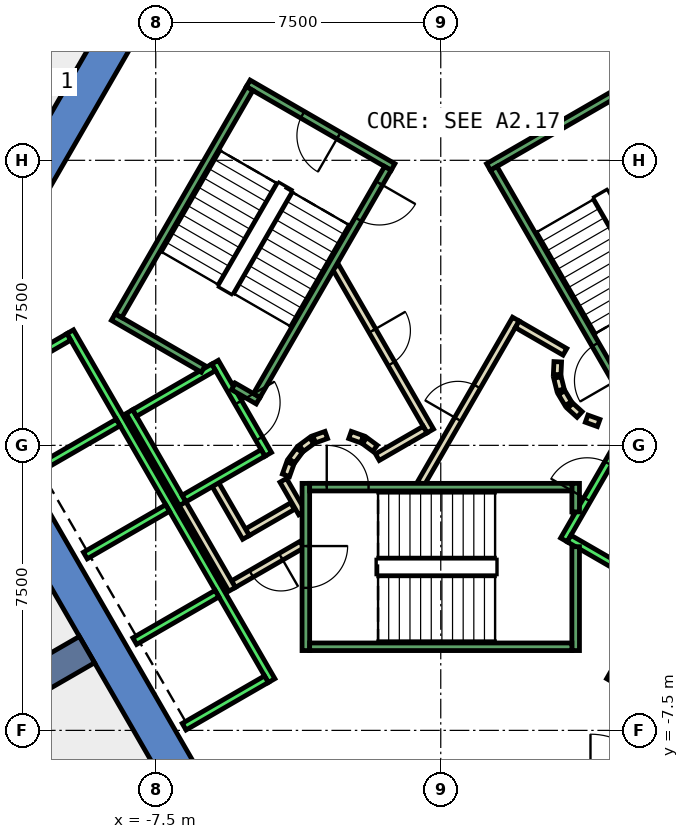
"""IFC4 building model, lengths in metres.
Left out: names, types, materials, properties, quantities, classifications, styles, units other than length and angle.
Written with IfcOpenShell. Run it as: python <this file> out.ifc"""

import sys

from ifc_helpers import new_model, si_unit, direction, frame, frame_2d, origin, place, context, subcontext, project, spatial, polyline, rectangle, outline, extrude, element, fill, save


model = new_model("IFC4")
c1 = context("Model", 3, precision=1e-05, world=origin(), true_north=direction((0.0, 1.0)))
c2 = subcontext(c1, "Body", "Model", "MODEL_VIEW")
j1 = project(units=[si_unit("LENGTHUNIT", "METRE"), si_unit("PLANEANGLEUNIT", "RADIAN")], contexts=[c1])
p1 = place(None, origin())
s1 = spatial("IfcSite", under=j1, at=p1, CompositionType="ELEMENT")
p2 = place(p1, origin())
s2 = spatial("IfcBuilding", under=s1, at=p2, CompositionType="ELEMENT")
p3 = place(p2, frame((0.0, 0.0, 77.0)))
s3 = spatial("IfcBuildingStorey", under=s2, at=p3, CompositionType="ELEMENT", Elevation=77.0)
p4 = place(p3, frame((0.0, 0.0, -0.4)))
e1 = element("IfcWall", 1, at=p4, inside=s3, PredefinedType="SHEAR", context=c2, shape_type="SweptSolid", body=[
    extrude(outline(polyline([(-12.267, 5.252), (-11.444, 4.777), (-6.38, 13.55), (-6.928, 14.5), (-12.267, 5.252)])), origin(), (0.0, 0.0, 1.0), 4.0),
])
p5 = place(p3, frame((0.0, 0.0, -0.4)))
e2 = element("IfcWall", 2, at=p5, inside=s3, PredefinedType="SHEAR", context=c2, shape_type="SweptSolid", body=[
    extrude(outline(polyline([(-13.856, 2.5), (-6.928, -9.5), (-6.38, -8.55), (-12.759, 2.5), (-13.856, 2.5)])), origin(), (0.0, 0.0, 1.0), 4.0),
])
p6 = place(p3, frame((-9.31, -5.375, -0.4), z_axis=(0.0, 0.0, 1.0), x_axis=(-0.866017533419, -0.500013631625, 0.0)))
e3 = element("IfcWall", 3, at=p6, inside=s3, PredefinedType="SHEAR", context=c2, shape_type="SweptSolid", body=[
    extrude(rectangle(XDim=9.0, YDim=0.8, at=frame_2d((4.5, 0.0))), origin(), (0.0, 0.0, 1.0), 4.0),
])
p7 = place(p3, frame((-3.9, -1.599, 0.0), z_axis=(0.0, 0.0, 1.0), x_axis=(-0.865969445389, -0.500096910261, 0.0)))
e4 = element("IfcWall", 4, at=p7, inside=s3, PredefinedType="PARTITIONING", context=c2, shape_type="SweptSolid", body=[
    extrude(rectangle(XDim=1.373, YDim=0.2, at=frame_2d((0.687, 0.0))), origin(), (0.0, 0.0, 1.0), 3.6),
])
p8 = place(p3, frame((-5.126, -2.422, 0.0), z_axis=(0.0, 0.0, 1.0), x_axis=(-0.500062241894, 0.865989465428, 0.0)))
e5 = element("IfcWall", 5, at=p8, inside=s3, PredefinedType="PARTITIONING", context=c2, shape_type="SweptSolid", body=[
    extrude(rectangle(XDim=1.7, YDim=0.2, at=frame_2d((0.85, 0.0))), origin(), (0.0, 0.0, 1.0), 3.6),
])
p9 = place(p3, frame((-3.65, -2.61, 0.0), z_axis=(0.0, 0.0, 1.0), x_axis=(-0.866072462134, -0.499918483688, 0.0)))
e6 = element("IfcWall", 6, at=p9, inside=s3, PredefinedType="PARTITIONING", context=c2, shape_type="SweptSolid", body=[
    extrude(rectangle(XDim=2.084, YDim=0.2, at=frame_2d((1.042, 0.0))), origin(), (0.0, 0.0, 1.0), 3.6),
])
p10 = place(p9, frame((0.642, 0.0, 0.0)))
e7 = element("IfcOpeningElement", 7, at=p10, cuts=e6, PredefinedType="OPENING", context=c2, shape_type="SweptSolid", body=[
    extrude(rectangle(XDim=0.9, YDim=2.1, at=frame_2d((0.45, 1.05))), frame((0.0, 0.11, 0.0), z_axis=(0.0, -1.0, 0.0), x_axis=(1.0, 0.0, 0.0)), (0.0, 0.0, 1.0), 0.22),
])
p11 = place(p3, frame((-5.492, -3.788, 0.0), z_axis=(0.0, 0.0, 1.0), x_axis=(-0.500008949224, 0.866020236886, 0.0)))
e8 = element("IfcWall", 8, at=p11, inside=s3, PredefinedType="PARTITIONING", context=c2, shape_type="SweptSolid", body=[
    extrude(rectangle(XDim=2.68, YDim=0.2, at=frame_2d((1.34, 0.0))), origin(), (0.0, 0.0, 1.0), 3.6),
])
p12 = place(p3, frame((-4.145, -0.92, 0.0), z_axis=(0.0, 0.0, 1.0), x_axis=(0.499743786207, -0.866173278362, 0.0)))
e9 = element("IfcWall", 9, at=p12, inside=s3, PredefinedType="PARTITIONING", context=c2, shape_type="SweptSolid", body=[
    extrude(rectangle(XDim=0.991, YDim=0.2, at=frame_2d((0.495, 0.0))), origin(), (0.0, 0.0, 1.0), 3.6),
])
p13 = place(p3, frame((-0.52, -1.0, 0.0), z_axis=(0.0, 0.0, 1.0), x_axis=(0.50011622646, 0.865958290007, 0.0)))
e10 = element("IfcWall", 10, at=p13, inside=s3, PredefinedType="PARTITIONING", context=c2, shape_type="SweptSolid", body=[
    extrude(rectangle(XDim=4.991, YDim=0.2, at=frame_2d((2.496, 0.0))), origin(), (0.0, 0.0, 1.0), 3.6),
])
p14 = place(p13, frame((1.945, 0.0, 0.0)))
e11 = element("IfcOpeningElement", 11, at=p14, cuts=e10, PredefinedType="OPENING", context=c2, shape_type="SweptSolid", body=[
    extrude(rectangle(XDim=1.0, YDim=2.1, at=frame_2d((0.5, 1.05))), frame((0.0, 0.11, 0.0), z_axis=(0.0, -1.0, 0.0), x_axis=(1.0, 0.0, 0.0)), (0.0, 0.0, 1.0), 0.22),
])
p15 = place(p3, frame((2.012, 3.186, 0.0), z_axis=(0.0, 0.0, 1.0), x_axis=(0.865891012941, -0.500232699559, 0.0)))
e12 = element("IfcWall", 12, at=p15, inside=s3, PredefinedType="PARTITIONING", context=c2, shape_type="SweptSolid", body=[
    extrude(rectangle(XDim=1.449, YDim=0.2, at=frame_2d((0.725, 0.0))), origin(), (0.0, 0.0, 1.0), 3.6),
])
p16 = place(p3, frame((3.079, 2.199, 0.0), z_axis=(0.0, 0.0, 1.0), x_axis=(-0.047771483479, -0.998858290933, 0.0)))
e13 = element("IfcWall", 13, at=p16, inside=s3, PredefinedType="PARTITIONING", context=c2, shape_type="SweptSolid", body=[
    extrude(rectangle(XDim=0.337, YDim=0.2, at=frame_2d((0.169, 0.0))), origin(), (0.0, 0.0, 1.0), 3.6),
])
p17 = place(p3, frame((3.07, 1.786, 0.0), z_axis=(0.0, 0.0, 1.0), x_axis=(0.242705583207, -0.970099994784, 0.0)))
e14 = element("IfcWall", 14, at=p17, inside=s3, PredefinedType="PARTITIONING", context=c2, shape_type="SweptSolid", body=[
    extrude(rectangle(XDim=0.338, YDim=0.2, at=frame_2d((0.169, 0.0))), origin(), (0.0, 0.0, 1.0), 3.6),
])
for number, where, z_axis, x_axis in (
    (15, (3.182, 1.388, 0.0), (0.0, 0.0, 1.0), (0.512, -0.859, 0.0)),
    (16, (3.404, 1.039, 0.0), (0.0, 0.0, 1.0), (0.74, -0.672, 0.0)),
):
    element("IfcWall", number, at=place(p3, frame(where, z_axis=z_axis, x_axis=x_axis)), inside=s3, PredefinedType="PARTITIONING", context=c2, shape_type="SweptSolid", body=[
        extrude(rectangle(XDim=0.338, YDim=0.2, at=frame_2d((0.169, 0.0))), origin(), (0.0, 0.0, 1.0), 3.6),
    ])
p18 = place(p3, frame((3.838, 0.702, 0.0), z_axis=(0.0, 0.0, 1.0), x_axis=(0.941035081519, -0.338308993895, 0.0)))
e17 = element("IfcWall", 17, at=p18, inside=s3, PredefinedType="PARTITIONING", context=c2, shape_type="SweptSolid", body=[
    extrude(rectangle(XDim=0.337, YDim=0.2, at=frame_2d((0.168, 0.0))), origin(), (0.0, 0.0, 1.0), 3.6),
])
p19 = place(p3, frame((-2.771, 4.7, 0.0), z_axis=(0.0, 0.0, 1.0), x_axis=(0.499969479948, -0.866043023828, 0.0)))
e18 = element("IfcWall", 18, at=p19, inside=s3, PredefinedType="PARTITIONING", context=c2, shape_type="SweptSolid", body=[
    extrude(rectangle(XDim=4.99, YDim=0.2, at=frame_2d((2.495, 0.0))), origin(), (0.0, 0.0, 1.0), 3.6),
])
p20 = place(p19, frame((1.945, 0.0, 0.0)))
e19 = element("IfcOpeningElement", 19, at=p20, cuts=e18, PredefinedType="OPENING", context=c2, shape_type="SweptSolid", body=[
    extrude(rectangle(XDim=1.0, YDim=2.1, at=frame_2d((0.5, 1.05))), frame((0.0, 0.11, 0.0), z_axis=(0.0, -1.0, 0.0), x_axis=(1.0, 0.0, 0.0)), (0.0, 0.0, 1.0), 0.22),
])
p21 = place(p3, frame((-0.412, 0.414, 0.0), z_axis=(0.0, 0.0, 1.0), x_axis=(-0.866017369001, -0.500013916395, 0.0)))
e20 = element("IfcWall", 20, at=p21, inside=s3, PredefinedType="PARTITIONING", context=c2, shape_type="SweptSolid", body=[
    extrude(rectangle(XDim=1.45, YDim=0.2, at=frame_2d((0.725, 0.0))), origin(), (0.0, 0.0, 1.0), 3.6),
])
p22 = place(p3, frame((-1.731, -0.077, 0.0), z_axis=(0.0, 0.0, 1.0), x_axis=(-0.804311165252, 0.594208338422, 0.0)))
e21 = element("IfcWall", 21, at=p22, inside=s3, PredefinedType="PARTITIONING", context=c2, shape_type="SweptSolid", body=[
    extrude(rectangle(XDim=0.338, YDim=0.2, at=frame_2d((0.169, 0.0))), origin(), (0.0, 0.0, 1.0), 3.6),
])
p23 = place(p3, frame((-2.07, 0.16, 0.0), z_axis=(0.0, 0.0, 1.0), x_axis=(-0.942199461132, 0.335052496547, 0.0)))
e22 = element("IfcWall", 22, at=p23, inside=s3, PredefinedType="PARTITIONING", context=c2, shape_type="SweptSolid", body=[
    extrude(rectangle(XDim=0.337, YDim=0.2, at=frame_2d((0.169, 0.0))), origin(), (0.0, 0.0, 1.0), 3.6),
])
p24 = place(p3, frame((-3.012, 0.273, 0.0), z_axis=(0.0, 0.0, 1.0), x_axis=(-0.942280615813, -0.334824194261, 0.0)))
e23 = element("IfcWall", 23, at=p24, inside=s3, PredefinedType="PARTITIONING", context=c2, shape_type="SweptSolid", body=[
    extrude(rectangle(XDim=0.338, YDim=0.2, at=frame_2d((0.169, 0.0))), origin(), (0.0, 0.0, 1.0), 3.6),
])
p25 = place(p3, frame((-3.397, 0.124, 0.0), z_axis=(0.0, 0.0, 1.0), x_axis=(-0.804311165252, -0.594208338422, 0.0)))
e24 = element("IfcWall", 24, at=p25, inside=s3, PredefinedType="PARTITIONING", context=c2, shape_type="SweptSolid", body=[
    extrude(rectangle(XDim=0.338, YDim=0.2, at=frame_2d((0.169, 0.0))), origin(), (0.0, 0.0, 1.0), 3.6),
])
p26 = place(p3, frame((-3.723, -0.131, 0.0), z_axis=(0.0, 0.0, 1.0), x_axis=(-0.594675113454, -0.803966112121, 0.0)))
e25 = element("IfcWall", 25, at=p26, inside=s3, PredefinedType="PARTITIONING", context=c2, shape_type="SweptSolid", body=[
    extrude(rectangle(XDim=0.338, YDim=0.2, at=frame_2d((0.169, 0.0))), origin(), (0.0, 0.0, 1.0), 3.6),
])
p27 = place(p3, frame((-3.96, -0.47, 0.0), z_axis=(0.0, 0.0, 1.0), x_axis=(-0.334824194261, -0.942280615813, 0.0)))
e26 = element("IfcWall", 26, at=p27, inside=s3, PredefinedType="PARTITIONING", context=c2, shape_type="SweptSolid", body=[
    extrude(rectangle(XDim=0.338, YDim=0.2, at=frame_2d((0.169, 0.0))), origin(), (0.0, 0.0, 1.0), 3.6),
])
p28 = place(p3, frame((-5.94, 2.188, 0.0), z_axis=(0.0, 0.0, 1.0), x_axis=(0.49994636267, -0.866056369097, 0.0)))
e27 = element("IfcWall", 27, at=p28, inside=s3, PredefinedType="STANDARD", context=c2, shape_type="SweptSolid", body=[
    extrude(rectangle(XDim=2.8, YDim=0.2, at=frame_2d((1.4, 0.0))), origin(), (0.0, 0.0, 1.0), 3.6),
])
p29 = place(p28, frame((1.225, 0.0, 0.0)))
e28 = element("IfcOpeningElement", 28, at=p29, cuts=e27, PredefinedType="OPENING", context=c2, shape_type="SweptSolid", body=[
    extrude(rectangle(XDim=1.1, YDim=2.1, at=frame_2d((0.55, 1.05))), frame((0.0, 0.11, 0.0), z_axis=(0.0, -1.0, 0.0), x_axis=(1.0, 0.0, 0.0)), (0.0, 0.0, 1.0), 0.22),
])
p30 = place(p3, frame((-8.192, 0.888, 0.0), z_axis=(0.0, 0.0, 1.0), x_axis=(0.49994636267, -0.866056369097, 0.0)))
e29 = element("IfcWall", 29, at=p30, inside=s3, PredefinedType="STANDARD", context=c2, shape_type="SweptSolid", body=[
    extrude(rectangle(XDim=2.8, YDim=0.2, at=frame_2d((1.4, 0.0))), origin(), (0.0, 0.0, 1.0), 3.6),
])
for number, where, z_axis, x_axis in (
    (30, (-5.977, 2.052, 0.0), (0.0, 0.0, 1.0), (-0.866, -0.5, 0.0)),
    (31, (-4.677, -0.2, 0.0), (0.0, 0.0, 1.0), (-0.866, -0.5, 0.0)),
):
    element("IfcWall", number, at=place(p3, frame(where, z_axis=z_axis, x_axis=x_axis)), inside=s3, PredefinedType="STANDARD", context=c2, shape_type="SweptSolid", body=[
        extrude(rectangle(XDim=2.399, YDim=0.2, at=frame_2d((1.2, 0.0))), origin(), (0.0, 0.0, 1.0), 3.6),
    ])
p31 = place(p3, frame((-9.751, 2.99, 0.0), z_axis=(0.0, 0.0, 1.0), x_axis=(0.50000090737, -0.866024879913, 0.0)))
e32 = element("IfcWall", 32, at=p31, inside=s3, PredefinedType="STANDARD", context=c2, shape_type="SweptSolid", body=[
    extrude(rectangle(XDim=10.6, YDim=0.2, at=frame_2d((5.3, 0.0))), origin(), (0.0, 0.0, 1.0), 3.6),
])
p32 = place(p3, frame((-9.788, 2.853, 0.0), z_axis=(0.0, 0.0, 1.0), x_axis=(-0.865998541277, -0.500046524342, 0.0)))
e33 = element("IfcWall", 33, at=p32, inside=s3, PredefinedType="STANDARD", context=c2, shape_type="SweptSolid", body=[
    extrude(rectangle(XDim=2.5, YDim=0.2, at=frame_2d((1.25, 0.0))), origin(), (0.0, 0.0, 1.0), 3.6),
])
for number, where, z_axis, x_axis in (
    (34, (-8.488, 0.602, 0.0), (0.0, 0.0, 1.0), (-0.866, -0.5, 0.0)),
    (35, (-7.188, -1.65, 0.0), (0.0, 0.0, 1.0), (-0.866, -0.5, 0.0)),
    (36, (-5.888, -3.902, 0.0), (0.0, 0.0, 1.0), (-0.866, -0.5, 0.0)),
    (37, (-4.588, -6.153, 0.0), (0.0, 0.0, 1.0), (-0.866, -0.5, 0.0)),
):
    element("IfcWall", number, at=place(p3, frame(where, z_axis=z_axis, x_axis=x_axis)), inside=s3, PredefinedType="STANDARD", context=c2, shape_type="SweptSolid", body=[
        extrude(rectangle(XDim=2.5, YDim=0.2, at=frame_2d((1.25, 0.0))), origin(), (0.0, 0.0, 1.0), 3.6),
    ])
p33 = place(p3, frame((3.24, -2.488, 0.0), z_axis=(0.0, 0.0, 1.0), x_axis=(0.49994636267, 0.866056369097, 0.0)))
e38 = element("IfcWall", 38, at=p33, inside=s3, PredefinedType="STANDARD", context=c2, shape_type="SweptSolid", body=[
    extrude(rectangle(XDim=2.8, YDim=0.2, at=frame_2d((1.4, 0.0))), origin(), (0.0, 0.0, 1.0), 3.6),
])
p34 = place(p33, frame((1.225, 0.0, 0.0)))
e39 = element("IfcOpeningElement", 39, at=p34, cuts=e38, PredefinedType="OPENING", context=c2, shape_type="SweptSolid", body=[
    extrude(rectangle(XDim=1.1, YDim=2.1, at=frame_2d((0.55, 1.05))), frame((0.0, 0.11, 0.0), z_axis=(0.0, -1.0, 0.0), x_axis=(1.0, 0.0, 0.0)), (0.0, 0.0, 1.0), 0.22),
])
p35 = place(p3, frame((3.377, -2.452, 0.0), z_axis=(0.0, 0.0, 1.0), x_axis=(0.865955154139, -0.50012165622, 0.0)))
e40 = element("IfcWall", 40, at=p35, inside=s3, PredefinedType="STANDARD", context=c2, shape_type="SweptSolid", body=[
    extrude(rectangle(XDim=2.4, YDim=0.2, at=frame_2d((1.2, 0.0))), origin(), (0.0, 0.0, 1.0), 3.6),
])
p36 = place(p3, frame((4.451, -6.19, 0.0), z_axis=(0.0, 0.0, 1.0), x_axis=(0.50000090737, 0.866024879913, 0.0)))
e41 = element("IfcWall", 41, at=p36, inside=s3, PredefinedType="STANDARD", context=c2, shape_type="SweptSolid", body=[
    extrude(rectangle(XDim=10.6, YDim=0.2, at=frame_2d((5.3, 0.0))), origin(), (0.0, 0.0, 1.0), 3.6),
])
p37 = place(p3, frame((-3.55, -1.0, 0.0), z_axis=(0.0, 0.0, 1.0), x_axis=(0.0, -1.0, 0.0)))
e42 = element("IfcWall", 42, at=p37, inside=s3, PredefinedType="STANDARD", context=c2, shape_type="SweptSolid", body=[
    extrude(rectangle(XDim=4.4, YDim=0.2, at=frame_2d((2.2, 0.0))), origin(), (0.0, 0.0, 1.0), 3.6),
])
p38 = place(p37, frame((1.65, 0.0, 0.0)))
e43 = element("IfcOpeningElement", 43, at=p38, cuts=e42, PredefinedType="OPENING", context=c2, shape_type="SweptSolid", body=[
    extrude(rectangle(XDim=1.1, YDim=2.2, at=frame_2d((0.55, 1.1))), frame((0.0, 0.11, 0.0), z_axis=(0.0, -1.0, 0.0), x_axis=(1.0, 0.0, 0.0)), (0.0, 0.0, 1.0), 0.22),
])
p39 = place(p3, frame((3.55, -2.667, 0.0), z_axis=(0.0, 0.0, 1.0), x_axis=(0.0, -1.0, 0.0)))
e44 = element("IfcWall", 44, at=p39, inside=s3, PredefinedType="STANDARD", context=c2, shape_type="SweptSolid", body=[
    extrude(rectangle(XDim=2.733, YDim=0.2, at=frame_2d((1.366, 0.0))), origin(), (0.0, 0.0, 1.0), 3.6),
])
p40 = place(p3, frame((3.55, -1.0, 0.0), z_axis=(0.0, 0.0, 1.0), x_axis=(0.0, -1.0, 0.0)))
e45 = element("IfcWall", 45, at=p40, inside=s3, PredefinedType="STANDARD", context=c2, shape_type="SweptSolid", body=[
    extrude(rectangle(XDim=0.751, YDim=0.2, at=frame_2d((0.375, 0.0))), origin(), (0.0, 0.0, 1.0), 3.6),
])
p41 = place(p3, frame((-3.45, -1.1, 0.0), z_axis=(0.0, 0.0, 1.0), x_axis=(1.0, 0.0, 0.0)))
e46 = element("IfcWall", 46, at=p41, inside=s3, PredefinedType="STANDARD", context=c2, shape_type="SweptSolid", body=[
    extrude(rectangle(XDim=6.9, YDim=0.2, at=frame_2d((3.45, 0.0))), origin(), (0.0, 0.0, 1.0), 3.6),
])
p42 = place(p41, frame((0.45, 0.0, 0.0)))
e47 = element("IfcOpeningElement", 47, at=p42, cuts=e46, PredefinedType="OPENING", context=c2, shape_type="SweptSolid", body=[
    extrude(rectangle(XDim=1.1, YDim=2.2, at=frame_2d((0.55, 1.1))), frame((0.0, 0.11, 0.0), z_axis=(0.0, -1.0, 0.0), x_axis=(1.0, 0.0, 0.0)), (0.0, 0.0, 1.0), 0.22),
])
p43 = place(p3, frame((-3.45, -5.3, 0.0), z_axis=(0.0, 0.0, 1.0), x_axis=(1.0, 0.0, 0.0)))
e48 = element("IfcWall", 48, at=p43, inside=s3, PredefinedType="STANDARD", context=c2, shape_type="SweptSolid", body=[
    extrude(rectangle(XDim=6.9, YDim=0.2, at=frame_2d((3.45, 0.0))), origin(), (0.0, 0.0, 1.0), 3.6),
])
p44 = place(p3, frame((1.256, 7.324, 0.0), z_axis=(0.0, 0.0, 1.0), x_axis=(0.866046073146, 0.499964197906, 0.0)))
e49 = element("IfcWall", 49, at=p44, inside=s3, PredefinedType="STANDARD", context=c2, shape_type="SweptSolid", body=[
    extrude(rectangle(XDim=4.4, YDim=0.2, at=frame_2d((2.2, 0.0))), origin(), (0.0, 0.0, 1.0), 3.6),
])
p45 = place(p3, frame((4.843, 1.312, 0.0), z_axis=(0.0, 0.0, 1.0), x_axis=(-0.499963383562, 0.866046543262, 0.0)))
e50 = element("IfcWall", 50, at=p45, inside=s3, PredefinedType="STANDARD", context=c2, shape_type="SweptSolid", body=[
    extrude(rectangle(XDim=6.9, YDim=0.2, at=frame_2d((3.45, 0.0))), origin(), (0.0, 0.0, 1.0), 3.6),
])
p46 = place(p45, frame((0.45, 0.0, 0.0)))
e51 = element("IfcOpeningElement", 51, at=p46, cuts=e50, PredefinedType="OPENING", context=c2, shape_type="SweptSolid", body=[
    extrude(rectangle(XDim=1.1, YDim=2.2, at=frame_2d((0.55, 1.1))), frame((0.0, 0.11, 0.0), z_axis=(0.0, -1.0, 0.0), x_axis=(1.0, 0.0, 0.0)), (0.0, 0.0, 1.0), 0.22),
])
p47 = place(p3, frame((-1.256, 7.324, 0.0), z_axis=(0.0, 0.0, 1.0), x_axis=(-0.866046073146, 0.499964197906, 0.0)))
e52 = element("IfcWall", 52, at=p47, inside=s3, PredefinedType="STANDARD", context=c2, shape_type="SweptSolid", body=[
    extrude(rectangle(XDim=4.4, YDim=0.2, at=frame_2d((2.2, 0.0))), origin(), (0.0, 0.0, 1.0), 3.6),
])
p48 = place(p47, frame((1.65, 0.0, 0.0)))
e53 = element("IfcOpeningElement", 53, at=p48, cuts=e52, PredefinedType="OPENING", context=c2, shape_type="SweptSolid", body=[
    extrude(rectangle(XDim=1.1, YDim=2.2, at=frame_2d((0.55, 1.1))), frame((0.0, 0.11, 0.0), z_axis=(0.0, -1.0, 0.0), x_axis=(1.0, 0.0, 0.0)), (0.0, 0.0, 1.0), 0.22),
])
p49 = place(p3, frame((-6.25, 2.01, 0.0), z_axis=(0.0, 0.0, 1.0), x_axis=(-0.86611865017, 0.499838457731, 0.0)))
e54 = element("IfcWall", 54, at=p49, inside=s3, PredefinedType="STANDARD", context=c2, shape_type="SweptSolid", body=[
    extrude(rectangle(XDim=2.733, YDim=0.2, at=frame_2d((1.366, 0.0))), origin(), (0.0, 0.0, 1.0), 3.6),
])
p50 = place(p3, frame((-4.806, 1.176, 0.0), z_axis=(0.0, 0.0, 1.0), x_axis=(-0.866558586415, 0.499075361355, 0.0)))
e55 = element("IfcWall", 55, at=p50, inside=s3, PredefinedType="STANDARD", context=c2, shape_type="SweptSolid", body=[
    extrude(rectangle(XDim=0.751, YDim=0.2, at=frame_2d((0.376, 0.0))), origin(), (0.0, 0.0, 1.0), 3.6),
])
p51 = place(p3, frame((-1.393, 7.288, 0.0), z_axis=(0.0, 0.0, 1.0), x_axis=(-0.499963383562, -0.866046543262, 0.0)))
e56 = element("IfcWall", 56, at=p51, inside=s3, PredefinedType="STANDARD", context=c2, shape_type="SweptSolid", body=[
    extrude(rectangle(XDim=6.9, YDim=0.2, at=frame_2d((3.45, 0.0))), origin(), (0.0, 0.0, 1.0), 3.6),
])
p52 = place(p51, frame((0.45, 0.0, 0.0)))
e57 = element("IfcOpeningElement", 57, at=p52, cuts=e56, PredefinedType="OPENING", context=c2, shape_type="SweptSolid", body=[
    extrude(rectangle(XDim=1.1, YDim=2.2, at=frame_2d((0.55, 1.1))), frame((0.0, 0.11, 0.0), z_axis=(0.0, -1.0, 0.0), x_axis=(1.0, 0.0, 0.0)), (0.0, 0.0, 1.0), 0.22),
])
p53 = place(p3, frame((-5.03, 9.388, 0.0), z_axis=(0.0, 0.0, 1.0), x_axis=(-0.499978703459, -0.866037698999, 0.0)))
e58 = element("IfcWall", 58, at=p53, inside=s3, PredefinedType="STANDARD", context=c2, shape_type="SweptSolid", body=[
    extrude(rectangle(XDim=6.9, YDim=0.2, at=frame_2d((3.45, 0.0))), origin(), (0.0, 0.0, 1.0), 3.6),
])
p54 = place(p14, origin())
e59 = element("IfcDoor", 59, at=p54, inside=s3, OperationType="SINGLE_SWING_LEFT", PredefinedType="DOOR", context=c2, shape_type="SweptSolid", body=[
    extrude(rectangle(XDim=1.0, YDim=2.1, at=frame_2d((0.5, 1.05))), frame((0.0, 0.025, 0.0), z_axis=(0.0, -1.0, 0.0), x_axis=(1.0, 0.0, 0.0)), (0.0, 0.0, 1.0), 0.05),
])
fill(e11, e59)
p55 = place(p20, origin())
e60 = element("IfcDoor", 60, at=p55, inside=s3, OperationType="SINGLE_SWING_RIGHT", PredefinedType="DOOR", context=c2, shape_type="SweptSolid", body=[
    extrude(rectangle(XDim=1.0, YDim=2.1, at=frame_2d((0.5, 1.05))), frame((0.0, 0.025, 0.0), z_axis=(0.0, -1.0, 0.0), x_axis=(1.0, 0.0, 0.0)), (0.0, 0.0, 1.0), 0.05),
])
fill(e19, e60)
p56 = place(p10, origin())
e61 = element("IfcDoor", 61, at=p56, inside=s3, OperationType="SINGLE_SWING_LEFT", PredefinedType="DOOR", context=c2, shape_type="SweptSolid", body=[
    extrude(rectangle(XDim=0.9, YDim=2.1, at=frame_2d((0.45, 1.05))), frame((0.0, 0.025, 0.0), z_axis=(0.0, -1.0, 0.0), x_axis=(1.0, 0.0, 0.0)), (0.0, 0.0, 1.0), 0.05),
])
fill(e7, e61)
p57 = place(p34, origin())
e62 = element("IfcDoor", 62, at=p57, inside=s3, OperationType="SLIDING_TO_LEFT", PredefinedType="DOOR", context=c2, shape_type="SweptSolid", body=[
    extrude(rectangle(XDim=1.1, YDim=2.1, at=frame_2d((0.55, 1.05))), frame((0.0, 0.025, 0.0), z_axis=(0.0, -1.0, 0.0), x_axis=(1.0, 0.0, 0.0)), (0.0, 0.0, 1.0), 0.05),
])
fill(e39, e62)
p58 = place(p29, origin())
e63 = element("IfcDoor", 63, at=p58, inside=s3, OperationType="SLIDING_TO_LEFT", PredefinedType="DOOR", context=c2, shape_type="SweptSolid", body=[
    extrude(rectangle(XDim=1.1, YDim=2.1, at=frame_2d((0.55, 1.05))), frame((0.0, 0.025, 0.0), z_axis=(0.0, -1.0, 0.0), x_axis=(1.0, 0.0, 0.0)), (0.0, 0.0, 1.0), 0.05),
])
fill(e28, e63)
p59 = place(p42, origin())
e64 = element("IfcDoor", 64, at=p59, inside=s3, OperationType="SINGLE_SWING_LEFT", PredefinedType="DOOR", context=c2, shape_type="SweptSolid", body=[
    extrude(rectangle(XDim=1.1, YDim=2.2, at=frame_2d((0.55, 1.1))), frame((0.0, 0.025, 0.0), z_axis=(0.0, -1.0, 0.0), x_axis=(1.0, 0.0, 0.0)), (0.0, 0.0, 1.0), 0.05),
])
fill(e47, e64)
p60 = place(p38, origin())
e65 = element("IfcDoor", 65, at=p60, inside=s3, OperationType="SINGLE_SWING_LEFT", PredefinedType="DOOR", context=c2, shape_type="SweptSolid", body=[
    extrude(rectangle(XDim=1.1, YDim=2.2, at=frame_2d((0.55, 1.1))), frame((0.0, 0.025, 0.0), z_axis=(0.0, -1.0, 0.0), x_axis=(1.0, 0.0, 0.0)), (0.0, 0.0, 1.0), 0.05),
])
fill(e43, e65)
p61 = place(p46, origin())
e66 = element("IfcDoor", 66, at=p61, inside=s3, OperationType="SINGLE_SWING_LEFT", PredefinedType="DOOR", context=c2, shape_type="SweptSolid", body=[
    extrude(rectangle(XDim=1.1, YDim=2.2, at=frame_2d((0.55, 1.1))), frame((0.0, 0.025, 0.0), z_axis=(0.0, -1.0, 0.0), x_axis=(1.0, 0.0, 0.0)), (0.0, 0.0, 1.0), 0.05),
])
fill(e51, e66)
p62 = place(p52, origin())
e67 = element("IfcDoor", 67, at=p62, inside=s3, OperationType="SINGLE_SWING_LEFT", PredefinedType="DOOR", context=c2, shape_type="SweptSolid", body=[
    extrude(rectangle(XDim=1.1, YDim=2.2, at=frame_2d((0.55, 1.1))), frame((0.0, 0.025, 0.0), z_axis=(0.0, -1.0, 0.0), x_axis=(1.0, 0.0, 0.0)), (0.0, 0.0, 1.0), 0.05),
])
fill(e57, e67)
p63 = place(p48, origin())
e68 = element("IfcDoor", 68, at=p63, inside=s3, OperationType="SINGLE_SWING_LEFT", PredefinedType="DOOR", context=c2, shape_type="SweptSolid", body=[
    extrude(rectangle(XDim=1.1, YDim=2.2, at=frame_2d((0.55, 1.1))), frame((0.0, 0.025, 0.0), z_axis=(0.0, -1.0, 0.0), x_axis=(1.0, 0.0, 0.0)), (0.0, 0.0, 1.0), 0.05),
])
fill(e53, e68)
save(model, sys.argv[1])
